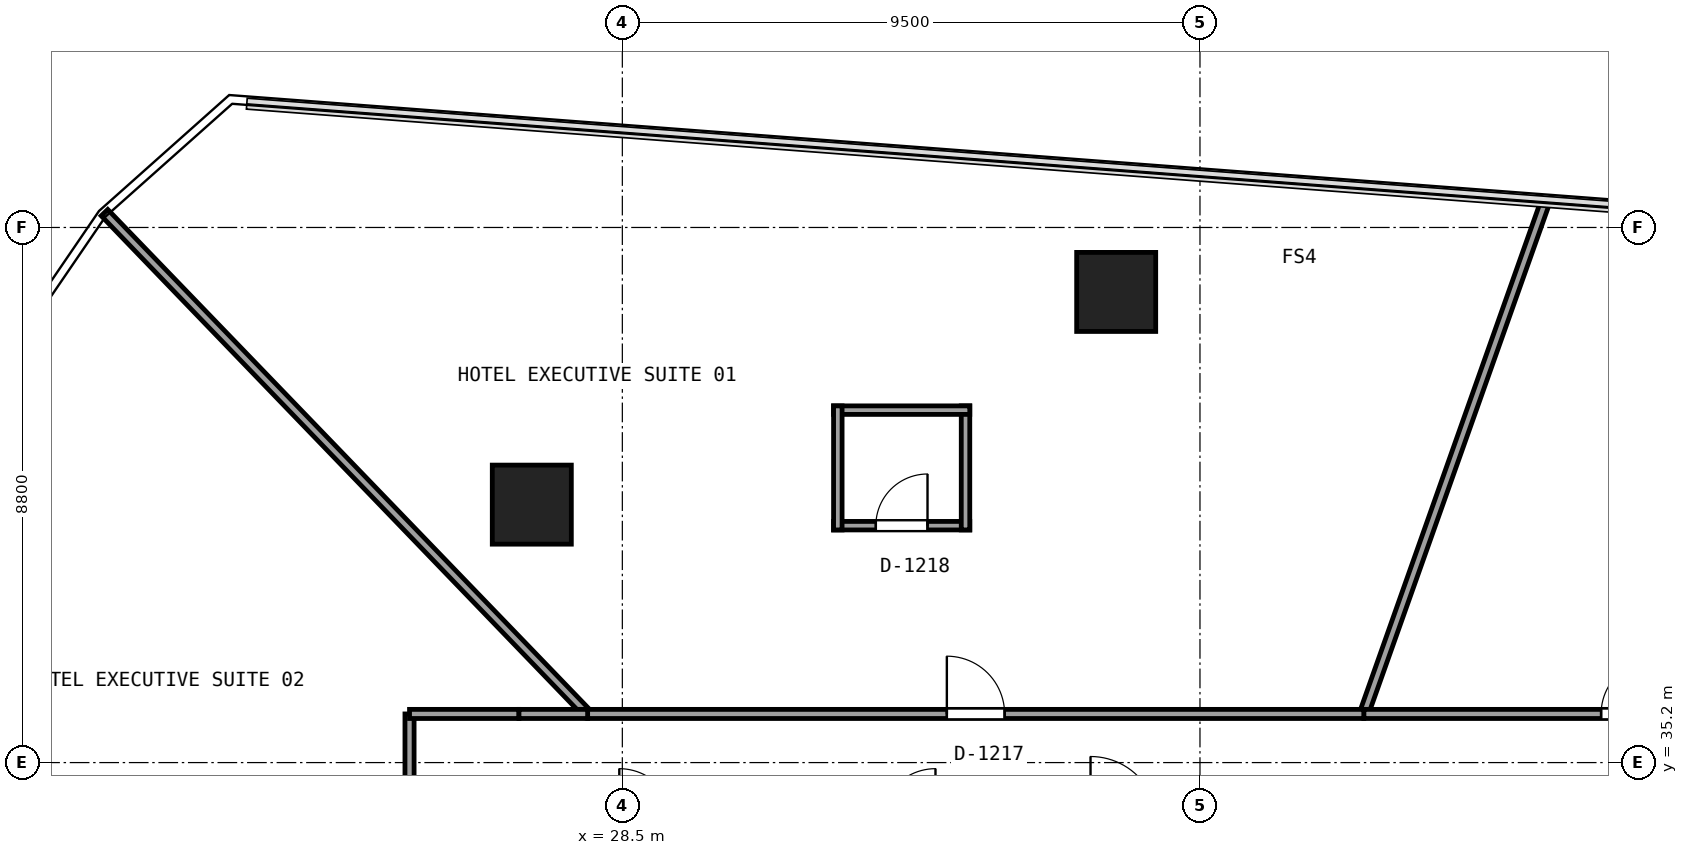
"""IFC4 building model, lengths in metres.
Left out: names, types, materials, properties, quantities, classifications, styles, units other than length and angle.
Written with IfcOpenShell. Run it as: python <this file> out.ifc"""

import sys

from ifc_helpers import new_model, si_unit, direction, frame, frame_2d, origin, origin_2d, place, context, subcontext, project, spatial, rectangle, extrude, element, fill, save


model = new_model("IFC4")
c1 = context("Model", 3, precision=1e-05, world=origin(), true_north=direction((0.0, 1.0)))
c2 = subcontext(c1, "Body", "Model", "MODEL_VIEW")
j1 = project(units=[si_unit("LENGTHUNIT", "METRE"), si_unit("PLANEANGLEUNIT", "RADIAN")], contexts=[c1])
p1 = place(None, origin())
s1 = spatial("IfcSite", under=j1, at=p1, CompositionType="ELEMENT")
p2 = place(p1, origin())
s2 = spatial("IfcBuilding", under=s1, at=p2, CompositionType="ELEMENT")
p3 = place(p2, frame((0.0, 0.0, 51.15)))
s3 = spatial("IfcBuildingStorey", under=s2, at=p3, CompositionType="ELEMENT", Elevation=51.15)
for number, where, z_axis, x_axis in (
    (1, (36.622, 42.94, 0.0), (0.0, 0.0, 1.0), (1.0, 0.0, 0.0)),
    (2, (27.011, 39.442, 0.0), (0.0, 0.0, 1.0), (1.0, 0.0, 0.0)),
):
    element("IfcColumn", number, at=place(p3, frame(where, z_axis=z_axis, x_axis=x_axis)), inside=s3, PredefinedType="COLUMN", context=c2, shape_type="SweptSolid", body=[
        extrude(rectangle(XDim=1.3, YDim=1.3, at=origin_2d()), origin(), (0.0, 0.0, 1.0), 3.17),
    ])
p4 = place(p3, frame((31.974, 39.096, 0.0), z_axis=(0.0, 0.0, 1.0), x_axis=(1.0, 0.0, 0.0)))
e3 = element("IfcWall", 3, at=p4, inside=s3, PredefinedType="PARTITIONING", context=c2, shape_type="SweptSolid", body=[
    extrude(rectangle(XDim=2.24, YDim=0.14, at=frame_2d((1.12, 0.0))), origin(), (0.0, 0.0, 1.0), 3.17),
])
p5 = place(p4, frame((0.695, 0.0, 0.0)))
e4 = element("IfcOpeningElement", 4, at=p5, cuts=e3, PredefinedType="OPENING", context=c2, shape_type="SweptSolid", body=[
    extrude(rectangle(XDim=0.85, YDim=2.1, at=frame_2d((0.425, 1.05))), frame((0.0, 0.08, 0.0), z_axis=(0.0, -1.0, 0.0), x_axis=(1.0, 0.0, 0.0)), (0.0, 0.0, 1.0), 0.16),
])
p6 = place(p3, frame((34.144, 39.026, 0.0), z_axis=(0.0, 0.0, 1.0), x_axis=(0.0, 1.0, 0.0)))
e5 = element("IfcWall", 5, at=p6, inside=s3, PredefinedType="PARTITIONING", context=c2, shape_type="SweptSolid", body=[
    extrude(rectangle(XDim=2.04, YDim=0.14, at=frame_2d((1.02, 0.0))), origin(), (0.0, 0.0, 1.0), 3.17),
])
p7 = place(p3, frame((34.214, 40.996, 0.0), z_axis=(0.0, 0.0, 1.0), x_axis=(-1.0, 0.0, 0.0)))
e6 = element("IfcWall", 6, at=p7, inside=s3, PredefinedType="PARTITIONING", context=c2, shape_type="SweptSolid", body=[
    extrude(rectangle(XDim=2.24, YDim=0.14, at=frame_2d((1.12, 0.0))), origin(), (0.0, 0.0, 1.0), 3.17),
])
p8 = place(p3, frame((32.044, 41.066, 0.0), z_axis=(0.0, 0.0, 1.0), x_axis=(0.0, -1.0, 0.0)))
e7 = element("IfcWall", 7, at=p8, inside=s3, PredefinedType="PARTITIONING", context=c2, shape_type="SweptSolid", body=[
    extrude(rectangle(XDim=2.04, YDim=0.14, at=frame_2d((1.02, 0.0))), origin(), (0.0, 0.0, 1.0), 3.17),
])
p9 = place(p3, frame((43.695, 44.465, 0.0), z_axis=(0.0, 0.0, 1.0), x_axis=(-0.334136466125, -0.94252470631, 0.0)))
e8 = element("IfcWall", 8, at=p9, inside=s3, PredefinedType="PARTITIONING", context=c2, shape_type="SweptSolid", body=[
    extrude(rectangle(XDim=8.981, YDim=0.15, at=frame_2d((4.491, 0.0))), origin(), (0.0, 0.0, 1.0), 2.355),
])
p10 = place(p3, frame((40.694, 36.0, 0.0), z_axis=(0.0, 0.0, 1.0), x_axis=(1.0, 0.0, 0.0)))
e9 = element("IfcWall", 9, at=p10, inside=s3, PredefinedType="PARTITIONING", context=c2, shape_type="SweptSolid", body=[
    extrude(rectangle(XDim=8.706, YDim=0.15, at=frame_2d((4.353, 0.0))), origin(), (0.0, 0.0, 1.0), 2.355),
])
p11 = place(p10, frame((3.903, 0.0, 0.0)))
e10 = element("IfcOpeningElement", 10, at=p11, cuts=e9, PredefinedType="OPENING", context=c2, shape_type="SweptSolid", body=[
    extrude(rectangle(XDim=0.9, YDim=2.0, at=frame_2d((0.45, 1.0))), frame((0.0, 0.085, 0.0), z_axis=(0.0, -1.0, 0.0), x_axis=(1.0, 0.0, 0.0)), (0.0, 0.0, 1.0), 0.17),
])
p12 = place(p3, frame((19.983, 44.244, 0.0), z_axis=(0.0, 0.0, 1.0), x_axis=(0.693980477279, -0.719993817442, 0.0)))
e11 = element("IfcWall", 11, at=p12, inside=s3, PredefinedType="PARTITIONING", context=c2, shape_type="SweptSolid", body=[
    extrude(rectangle(XDim=11.45, YDim=0.15, at=frame_2d((5.725, 0.0))), origin(), (0.0, 0.0, 1.0), 2.355),
])
p13 = place(p3, frame((27.929, 36.0, 0.0), z_axis=(0.0, 0.0, 1.0), x_axis=(1.0, 0.0, 0.0)))
e12 = element("IfcWall", 12, at=p13, inside=s3, PredefinedType="PARTITIONING", context=c2, shape_type="SweptSolid", body=[
    extrude(rectangle(XDim=12.765, YDim=0.15, at=frame_2d((6.383, 0.0))), origin(), (0.0, 0.0, 1.0), 2.395),
])
p14 = place(p13, frame((5.908, 0.0, 0.0)))
e13 = element("IfcOpeningElement", 13, at=p14, cuts=e12, PredefinedType="OPENING", context=c2, shape_type="SweptSolid", body=[
    extrude(rectangle(XDim=0.95, YDim=2.15, at=frame_2d((0.475, 1.075))), frame((0.0, 0.085, 0.0), z_axis=(0.0, -1.0, 0.0), x_axis=(1.0, 0.0, 0.0)), (0.0, 0.0, 1.0), 0.17),
])
p15 = place(p3, frame((25.0, 22.902, 0.0), z_axis=(0.0, 0.0, 1.0), x_axis=(0.0, 1.0, 0.0)))
e14 = element("IfcWall", 14, at=p15, inside=s3, PredefinedType="PARTITIONING", context=c2, shape_type="SweptSolid", body=[
    extrude(rectangle(XDim=13.098, YDim=0.15, at=frame_2d((6.549, 0.0))), origin(), (0.0, 0.0, 1.0), 2.355),
])
p16 = place(p15, frame((6.074, 0.0, 0.0)))
e15 = element("IfcOpeningElement", 15, at=p16, cuts=e14, PredefinedType="OPENING", context=c2, shape_type="SweptSolid", body=[
    extrude(rectangle(XDim=0.95, YDim=2.15, at=frame_2d((0.475, 1.075))), frame((0.0, 0.085, 0.0), z_axis=(0.0, -1.0, 0.0), x_axis=(1.0, 0.0, 0.0)), (0.0, 0.0, 1.0), 0.17),
])
p17 = place(p3, frame((25.0, 36.0, 0.0), z_axis=(0.0, 0.0, 1.0), x_axis=(1.0, 0.0, 0.0)))
e16 = element("IfcWall", 16, at=p17, inside=s3, PredefinedType="PARTITIONING", context=c2, shape_type="SweptSolid", body=[
    extrude(rectangle(XDim=1.8, YDim=0.15, at=frame_2d((0.9, 0.0))), origin(), (0.0, 0.0, 1.0), 2.355),
])
p18 = place(p3, frame((26.8, 36.0, 0.0), z_axis=(0.0, 0.0, 1.0), x_axis=(1.0, 0.0, 0.0)))
e17 = element("IfcWall", 17, at=p18, inside=s3, PredefinedType="PARTITIONING", context=c2, shape_type="SweptSolid", body=[
    extrude(rectangle(XDim=1.129, YDim=0.15, at=frame_2d((0.564, 0.0))), origin(), (0.0, 0.0, 1.0), 3.17),
])
p19 = place(p11, origin())
e18 = element("IfcDoor", 18, at=p19, inside=s3, OperationType="SINGLE_SWING_RIGHT", PredefinedType="DOOR", context=c2, shape_type="SweptSolid", body=[
    extrude(rectangle(XDim=0.9, YDim=2.0, at=frame_2d((0.45, 1.0))), frame((0.0, 0.025, 0.0), z_axis=(0.0, -1.0, 0.0), x_axis=(1.0, 0.0, 0.0)), (0.0, 0.0, 1.0), 0.05),
])
fill(e10, e18)
p20 = place(p14, origin())
e19 = element("IfcDoor", 19, at=p20, inside=s3, OperationType="SINGLE_SWING_LEFT", PredefinedType="DOOR", context=c2, shape_type="SweptSolid", body=[
    extrude(rectangle(XDim=0.95, YDim=2.15, at=frame_2d((0.475, 1.075))), frame((0.0, 0.025, 0.0), z_axis=(0.0, -1.0, 0.0), x_axis=(1.0, 0.0, 0.0)), (0.0, 0.0, 1.0), 0.05),
])
fill(e13, e19)
p21 = place(p5, origin())
e20 = element("IfcDoor", 20, at=p21, inside=s3, OperationType="SINGLE_SWING_RIGHT", PredefinedType="DOOR", context=c2, shape_type="SweptSolid", body=[
    extrude(rectangle(XDim=0.85, YDim=2.1, at=frame_2d((0.425, 1.05))), frame((0.0, 0.025, 0.0), z_axis=(0.0, -1.0, 0.0), x_axis=(1.0, 0.0, 0.0)), (0.0, 0.0, 1.0), 0.05),
])
fill(e4, e20)
save(model, sys.argv[1])
